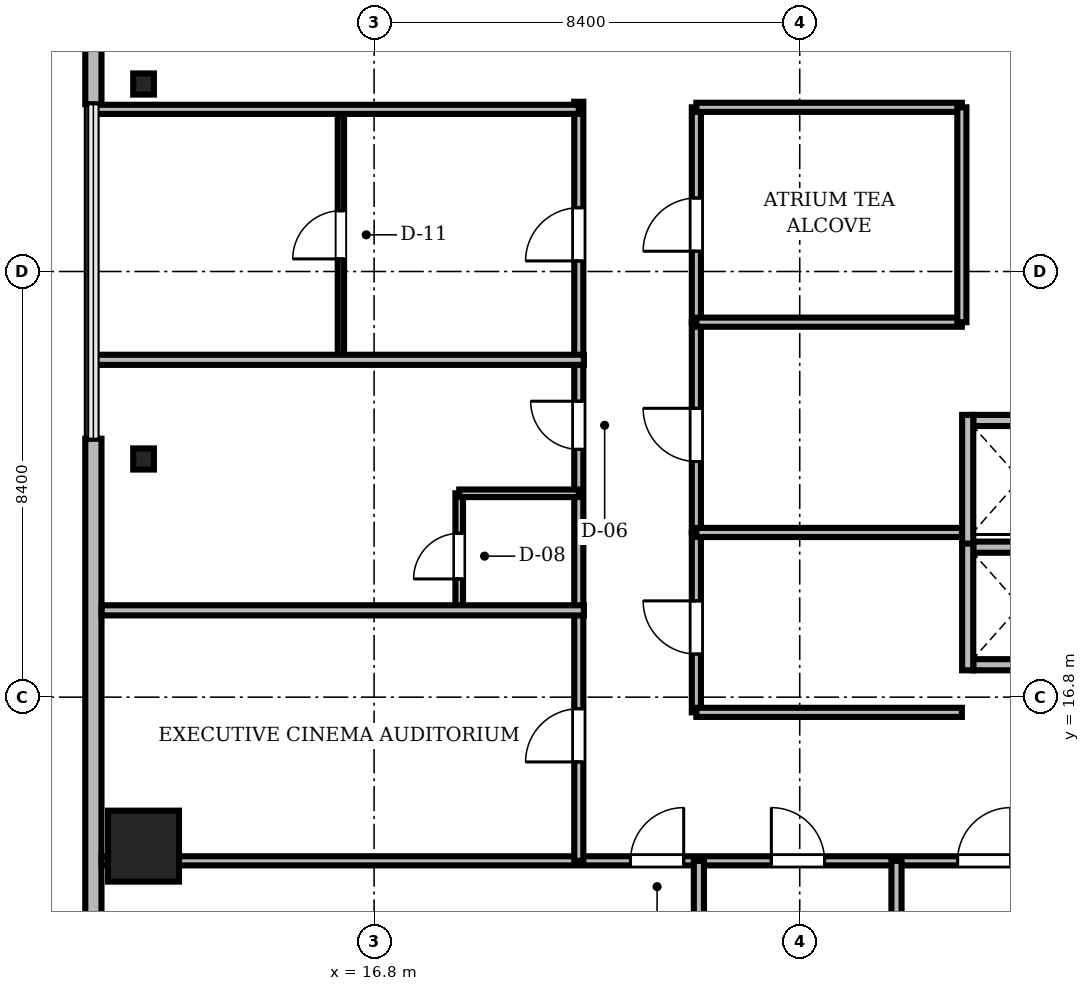
"""IFC4 building model, lengths in metres.
Left out: names, types, materials, properties, quantities, classifications, styles, units other than length and angle.
Written with IfcOpenShell. Run it as: python <this file> out.ifc"""

import sys

from ifc_helpers import new_model, si_unit, direction, frame, frame_2d, origin, origin_2d, place, context, subcontext, project, spatial, rectangle, i_section, extrude, source, transform, mapped, element, fill, save


model = new_model("IFC4")
c1 = context("Model", 3, precision=1e-05, world=origin(), true_north=direction((0.0, 1.0)))
c2 = subcontext(c1, "Body", "Model", "MODEL_VIEW")
j1 = project(units=[si_unit("LENGTHUNIT", "METRE"), si_unit("PLANEANGLEUNIT", "RADIAN")], contexts=[c1])
p1 = place(None, origin())
s1 = spatial("IfcSite", under=j1, at=p1, CompositionType="ELEMENT")
p2 = place(p1, origin())
s2 = spatial("IfcBuilding", under=s1, at=p2, CompositionType="ELEMENT")
p3 = place(p2, frame((0.0, 0.0, 218.55)))
s3 = spatial("IfcBuildingStorey", under=s2, at=p3, CompositionType="ELEMENT", Elevation=218.55)
m1 = source(origin(), c2, "Body", "SweptSolid", [
    extrude(rectangle(XDim=1.4, YDim=1.4, at=origin_2d()), origin(), (0.0, 0.0, 1.0), 3.53),
])
p4 = place(p3, frame((12.25, 13.86, 0.0), z_axis=(0.0, 0.0, 1.0), x_axis=(1.0, 0.0, 0.0)))
e1 = element("IfcColumn", 1, at=p4, inside=s3, PredefinedType="COLUMN", context=c2, shape_type="MappedRepresentation", body=[
    mapped(m1, transform((0.0, 0.0, 0.0), scale=1.0)),
])
m2 = source(origin(), c2, "Body", "SweptSolid", [
    extrude(i_section(OverallWidth=0.409, OverallDepth=0.417, WebThickness=0.021, FlangeThickness=0.033, FilletRadius=0.015, at=origin_2d()), origin(), (0.0, 0.0, 1.0), 3.53),
])
for number, where, z_axis, x_axis in (
    (2, (12.25, 28.9, 0.0), (0.0, 0.0, 1.0), (1.0, 0.0, 0.0)),
    (3, (12.25, 21.5, 0.0), (0.0, 0.0, 1.0), (1.0, 0.0, 0.0)),
):
    element("IfcColumn", number, at=place(p3, frame(where, z_axis=z_axis, x_axis=x_axis)), inside=s3, PredefinedType="COLUMN", context=c2, shape_type="MappedRepresentation", body=[
        mapped(m2, transform((0.0, 0.0, 0.0), scale=1.0)),
    ])
m3 = source(origin(), c2, "Body", "SweptSolid", [
    extrude(rectangle(XDim=15.6, YDim=0.32, at=frame_2d((7.8, 0.0))), origin(), (0.0, 0.0, 1.0), 3.53),
])
p5 = place(p3, frame((11.26, 44.1, 0.0), z_axis=(0.0, 0.0, 1.0), x_axis=(0.0, -1.0, 0.0)))
e4 = element("IfcWall", 4, at=p5, inside=s3, PredefinedType="SOLIDWALL", context=c2, shape_type="MappedRepresentation", body=[
    mapped(m3, transform((0.0, 0.0, 0.0), scale=1.0)),
])
m4 = source(origin(), c2, "Body", "SweptSolid", [
    extrude(rectangle(XDim=1.4, YDim=2.3, at=frame_2d((0.7, 1.15))), frame((0.0, 0.17, 0.0), z_axis=(0.0, -1.0, 0.0), x_axis=(1.0, 0.0, 0.0)), (0.0, 0.0, 1.0), 0.34),
])
p6 = place(p5, frame((9.61, 0.0, 0.0)))
e5 = element("IfcOpeningElement", 5, at=p6, cuts=e4, PredefinedType="OPENING", context=c2, shape_type="MappedRepresentation", body=[
    mapped(m4, transform((0.0, 0.0, 0.0), scale=1.0)),
])
m5 = source(origin(), c2, "Body", "SweptSolid", [
    extrude(rectangle(XDim=2.8, YDim=2.4, at=frame_2d((1.4, 1.2))), frame((0.0, 0.17, 0.0), z_axis=(0.0, -1.0, 0.0), x_axis=(1.0, 0.0, 0.0)), (0.0, 0.0, 1.0), 0.34),
])
p7 = place(p5, frame((2.705, 0.0, 0.72)))
e6 = element("IfcOpeningElement", 6, at=p7, cuts=e4, PredefinedType="OPENING", context=c2, shape_type="MappedRepresentation", body=[
    mapped(m5, transform((0.0, 0.0, 0.0), scale=1.0)),
])
m6 = source(origin(), c2, "Body", "SweptSolid", [
    extrude(rectangle(XDim=15.6, YDim=0.32, at=frame_2d((7.8, 0.0))), origin(), (0.0, 0.0, 1.0), 3.53),
])
p8 = place(p3, frame((11.26, 21.9, 0.0), z_axis=(0.0, 0.0, 1.0), x_axis=(0.0, -1.0, 0.0)))
e7 = element("IfcWall", 7, at=p8, inside=s3, PredefinedType="SOLIDWALL", context=c2, shape_type="MappedRepresentation", body=[
    mapped(m6, transform((0.0, 0.0, 0.0), scale=1.0)),
])
p9 = place(p8, frame((10.095, 0.0, 0.72)))
e8 = element("IfcOpeningElement", 8, at=p9, cuts=e7, PredefinedType="OPENING", context=c2, shape_type="MappedRepresentation", body=[
    mapped(m5, transform((0.0, 0.0, 0.0), scale=1.0)),
])
m7 = source(origin(), c2, "Body", "SweptSolid", [
    extrude(rectangle(XDim=1.85, YDim=0.22, at=frame_2d((0.925, 0.0))), origin(), (0.0, 0.0, 1.0), 2.972),
])
p10 = place(p3, frame((28.625, 17.44, 0.0), z_axis=(0.0, 0.0, 1.0), x_axis=(1.0, 0.0, 0.0)))
e9 = element("IfcWall", 9, at=p10, inside=s3, PredefinedType="SOLIDWALL", context=c2, shape_type="MappedRepresentation", body=[
    mapped(m7, transform((0.0, 0.0, 0.0), scale=1.0)),
])
m8 = source(origin(), c2, "Body", "SweptSolid", [
    extrude(rectangle(XDim=1.85, YDim=0.22, at=frame_2d((0.925, 0.0))), origin(), (0.0, 0.0, 1.0), 3.53),
])
p11 = place(p3, frame((28.625, 19.76, 0.0), z_axis=(0.0, 0.0, 1.0), x_axis=(1.0, 0.0, 0.0)))
e10 = element("IfcWall", 10, at=p11, inside=s3, PredefinedType="SOLIDWALL", context=c2, shape_type="MappedRepresentation", body=[
    mapped(m8, transform((0.0, 0.0, 0.0), scale=1.0)),
])
m9 = source(origin(), c2, "Body", "SweptSolid", [
    extrude(rectangle(XDim=2.54, YDim=0.22, at=frame_2d((1.27, 0.0))), origin(), (0.0, 0.0, 1.0), 2.972),
])
p12 = place(p3, frame((28.515, 17.33, 0.0), z_axis=(0.0, 0.0, 1.0), x_axis=(0.0, 1.0, 0.0)))
e11 = element("IfcWall", 11, at=p12, inside=s3, PredefinedType="SOLIDWALL", context=c2, shape_type="MappedRepresentation", body=[
    mapped(m9, transform((0.0, 0.0, 0.0), scale=1.0)),
])
p13 = place(p3, frame((28.625, 22.26, 0.0), z_axis=(0.0, 0.0, 1.0), x_axis=(1.0, 0.0, 0.0)))
e12 = element("IfcWall", 12, at=p13, inside=s3, PredefinedType="SOLIDWALL", context=c2, shape_type="MappedRepresentation", body=[
    mapped(m8, transform((0.0, 0.0, 0.0), scale=1.0)),
])
m10 = source(origin(), c2, "Body", "SweptSolid", [
    extrude(rectangle(XDim=2.54, YDim=0.22, at=frame_2d((1.27, 0.0))), origin(), (0.0, 0.0, 1.0), 3.53),
])
p14 = place(p3, frame((28.515, 19.83, 0.0), z_axis=(0.0, 0.0, 1.0), x_axis=(0.0, 1.0, 0.0)))
e13 = element("IfcWall", 13, at=p14, inside=s3, PredefinedType="SOLIDWALL", context=c2, shape_type="MappedRepresentation", body=[
    mapped(m10, transform((0.0, 0.0, 0.0), scale=1.0)),
])
m11 = source(origin(), c2, "Body", "SweptSolid", [
    extrude(rectangle(XDim=46.156, YDim=0.18, at=frame_2d((23.078, 0.0))), origin(), (0.0, 0.0, 1.0), 2.772),
])
p15 = place(p3, frame((11.422, 13.57, 0.0), z_axis=(0.0, 0.0, 1.0), x_axis=(1.0, 0.0, 0.0)))
e14 = element("IfcWall", 14, at=p15, inside=s3, PredefinedType="PARTITIONING", context=c2, shape_type="MappedRepresentation", body=[
    mapped(m11, transform((0.0, 0.0, 0.0), scale=1.0)),
])
m12 = source(origin(), c2, "Body", "SweptSolid", [
    extrude(rectangle(XDim=1.05, YDim=2.2, at=frame_2d((0.525, 1.1))), frame((0.0, 0.1, 0.0), z_axis=(0.0, -1.0, 0.0), x_axis=(1.0, 0.0, 0.0)), (0.0, 0.0, 1.0), 0.2),
])
p16 = place(p15, frame((10.438, 0.0, 0.0)))
e15 = element("IfcOpeningElement", 15, at=p16, cuts=e14, PredefinedType="OPENING", context=c2, shape_type="MappedRepresentation", body=[
    mapped(m12, transform((0.0, 0.0, 0.0), scale=1.0)),
])
p17 = place(p15, frame((13.218, 0.0, 0.0)))
e16 = element("IfcOpeningElement", 16, at=p17, cuts=e14, PredefinedType="OPENING", context=c2, shape_type="MappedRepresentation", body=[
    mapped(m12, transform((0.0, 0.0, 0.0), scale=1.0)),
])
p18 = place(p15, frame((16.893, 0.0, 0.0)))
e17 = element("IfcOpeningElement", 17, at=p18, cuts=e14, PredefinedType="OPENING", context=c2, shape_type="MappedRepresentation", body=[
    mapped(m12, transform((0.0, 0.0, 0.0), scale=1.0)),
])
p19 = place(p15, frame((20.346, 0.0, 0.0)))
e18 = element("IfcOpeningElement", 18, at=p19, cuts=e14, PredefinedType="OPENING", context=c2, shape_type="MappedRepresentation", body=[
    mapped(m12, transform((0.0, 0.0, 0.0), scale=1.0)),
])
p20 = place(p15, frame((24.124, 0.0, 0.0)))
e19 = element("IfcOpeningElement", 19, at=p20, cuts=e14, PredefinedType="OPENING", context=c2, shape_type="MappedRepresentation", body=[
    mapped(m12, transform((0.0, 0.0, 0.0), scale=1.0)),
])
p21 = place(p15, frame((28.226, 0.0, 0.0)))
e20 = element("IfcOpeningElement", 20, at=p21, cuts=e14, PredefinedType="OPENING", context=c2, shape_type="MappedRepresentation", body=[
    mapped(m12, transform((0.0, 0.0, 0.0), scale=1.0)),
])
p22 = place(p15, frame((33.077, 0.0, 0.0)))
e21 = element("IfcOpeningElement", 21, at=p22, cuts=e14, PredefinedType="OPENING", context=c2, shape_type="MappedRepresentation", body=[
    mapped(m12, transform((0.0, 0.0, 0.0), scale=1.0)),
])
p23 = place(p15, frame((37.498, 0.0, 0.0)))
e22 = element("IfcOpeningElement", 22, at=p23, cuts=e14, PredefinedType="OPENING", context=c2, shape_type="MappedRepresentation", body=[
    mapped(m12, transform((0.0, 0.0, 0.0), scale=1.0)),
])
m13 = source(origin(), c2, "Body", "SweptSolid", [
    extrude(rectangle(XDim=14.98, YDim=0.18, at=frame_2d((7.49, 0.0))), origin(), (0.0, 0.0, 1.0), 2.972),
])
p24 = place(p3, frame((20.84, 13.57, 0.0), z_axis=(0.0, 0.0, 1.0), x_axis=(0.0, 1.0, 0.0)))
e23 = element("IfcWall", 23, at=p24, inside=s3, PredefinedType="PARTITIONING", context=c2, shape_type="MappedRepresentation", body=[
    mapped(m13, transform((0.0, 0.0, 0.0), scale=1.0)),
])
p25 = place(p24, frame((1.952, 0.0, 0.0)))
e24 = element("IfcOpeningElement", 24, at=p25, cuts=e23, PredefinedType="OPENING", context=c2, shape_type="MappedRepresentation", body=[
    mapped(m12, transform((0.0, 0.0, 0.0), scale=1.0)),
])
m14 = source(origin(), c2, "Body", "SweptSolid", [
    extrude(rectangle(XDim=0.95, YDim=2.15, at=frame_2d((0.475, 1.075))), frame((0.0, 0.1, 0.0), z_axis=(0.0, -1.0, 0.0), x_axis=(1.0, 0.0, 0.0)), (0.0, 0.0, 1.0), 0.2),
])
p26 = place(p24, frame((8.12, 0.0, 0.0)))
e25 = element("IfcOpeningElement", 25, at=p26, cuts=e23, PredefinedType="OPENING", context=c2, shape_type="MappedRepresentation", body=[
    mapped(m14, transform((0.0, 0.0, 0.0), scale=1.0)),
])
p27 = place(p24, frame((11.838, 0.0, 0.0)))
e26 = element("IfcOpeningElement", 26, at=p27, cuts=e23, PredefinedType="OPENING", context=c2, shape_type="MappedRepresentation", body=[
    mapped(m12, transform((0.0, 0.0, 0.0), scale=1.0)),
])
m15 = source(origin(), c2, "Body", "SweptSolid", [
    extrude(rectangle(XDim=4.943, YDim=0.125, at=frame_2d((2.471, 0.0))), origin(), (0.0, 0.0, 1.0), 2.972),
])
p28 = place(p3, frame((16.145, 23.457, 0.0), z_axis=(0.0, 0.0, 1.0), x_axis=(0.0, 1.0, 0.0)))
e27 = element("IfcWall", 27, at=p28, inside=s3, PredefinedType="PARTITIONING", context=c2, shape_type="MappedRepresentation", body=[
    mapped(m15, transform((0.0, 0.0, 0.0), scale=1.0)),
])
m16 = source(origin(), c2, "Body", "SweptSolid", [
    extrude(rectangle(XDim=0.95, YDim=2.15, at=frame_2d((0.475, 1.075))), frame((0.0, 0.073, 0.0), z_axis=(0.0, -1.0, 0.0), x_axis=(1.0, 0.0, 0.0)), (0.0, 0.0, 1.0), 0.145),
])
p29 = place(p28, frame((1.992, 0.0, 0.0)))
e28 = element("IfcOpeningElement", 28, at=p29, cuts=e27, PredefinedType="OPENING", context=c2, shape_type="MappedRepresentation", body=[
    mapped(m16, transform((0.0, 0.0, 0.0), scale=1.0)),
])
m17 = source(origin(), c2, "Body", "SweptSolid", [
    extrude(rectangle(XDim=4.24, YDim=0.18, at=frame_2d((2.12, 0.0))), origin(), (0.0, 0.0, 1.0), 2.972),
])
p30 = place(p3, frame((23.16, 24.2, 0.0), z_axis=(0.0, 0.0, 1.0), x_axis=(0.0, 1.0, 0.0)))
e29 = element("IfcWall", 29, at=p30, inside=s3, PredefinedType="PARTITIONING", context=c2, shape_type="MappedRepresentation", body=[
    mapped(m17, transform((0.0, 0.0, 0.0), scale=1.0)),
])
p31 = place(p30, frame((1.4, 0.0, 0.0)))
e30 = element("IfcOpeningElement", 30, at=p31, cuts=e29, PredefinedType="OPENING", context=c2, shape_type="MappedRepresentation", body=[
    mapped(m12, transform((0.0, 0.0, 0.0), scale=1.0)),
])
m18 = source(origin(), c2, "Body", "SweptSolid", [
    extrude(rectangle(XDim=4.15, YDim=0.18, at=frame_2d((2.075, 0.0))), origin(), (0.0, 0.0, 1.0), 3.222),
])
p32 = place(p3, frame((23.16, 20.05, 0.0), z_axis=(0.0, 0.0, 1.0), x_axis=(0.0, 1.0, 0.0)))
e31 = element("IfcWall", 31, at=p32, inside=s3, PredefinedType="PARTITIONING", context=c2, shape_type="MappedRepresentation", body=[
    mapped(m18, transform((0.0, 0.0, 0.0), scale=1.0)),
])
p33 = place(p32, frame((1.4, 0.0, 0.0)))
e32 = element("IfcOpeningElement", 32, at=p33, cuts=e31, PredefinedType="OPENING", context=c2, shape_type="MappedRepresentation", body=[
    mapped(m12, transform((0.0, 0.0, 0.0), scale=1.0)),
])
m19 = source(origin(), c2, "Body", "SweptSolid", [
    extrude(rectangle(XDim=3.55, YDim=0.18, at=frame_2d((1.775, 0.0))), origin(), (0.0, 0.0, 1.0), 2.972),
])
p34 = place(p3, frame((23.16, 16.5, 0.0), z_axis=(0.0, 0.0, 1.0), x_axis=(0.0, 1.0, 0.0)))
e33 = element("IfcWall", 33, at=p34, inside=s3, PredefinedType="PARTITIONING", context=c2, shape_type="MappedRepresentation", body=[
    mapped(m19, transform((0.0, 0.0, 0.0), scale=1.0)),
])
p35 = place(p34, frame((1.15, 0.0, 0.0)))
e34 = element("IfcOpeningElement", 34, at=p35, cuts=e33, PredefinedType="OPENING", context=c2, shape_type="MappedRepresentation", body=[
    mapped(m12, transform((0.0, 0.0, 0.0), scale=1.0)),
])
m20 = source(origin(), c2, "Body", "SweptSolid", [
    extrude(rectangle(XDim=2.29, YDim=0.15, at=frame_2d((1.145, 0.0))), origin(), (0.0, 0.0, 1.0), 2.972),
])
p36 = place(p3, frame((18.48, 18.533, 0.0), z_axis=(0.0, 0.0, 1.0), x_axis=(0.0, 1.0, 0.0)))
e35 = element("IfcWall", 35, at=p36, inside=s3, PredefinedType="PARTITIONING", context=c2, shape_type="MappedRepresentation", body=[
    mapped(m20, transform((0.0, 0.0, 0.0), scale=1.0)),
])
m21 = source(origin(), c2, "Body", "SweptSolid", [
    extrude(rectangle(XDim=0.9, YDim=2.1, at=frame_2d((0.45, 1.05))), frame((0.0, 0.085, 0.0), z_axis=(0.0, -1.0, 0.0), x_axis=(1.0, 0.0, 0.0)), (0.0, 0.0, 1.0), 0.17),
])
p37 = place(p36, frame((0.6, 0.0, 0.0)))
e36 = element("IfcOpeningElement", 36, at=p37, cuts=e35, PredefinedType="OPENING", context=c2, shape_type="MappedRepresentation", body=[
    mapped(m21, transform((0.0, 0.0, 0.0), scale=1.0)),
])
m22 = source(origin(), c2, "Body", "SweptSolid", [
    extrude(rectangle(XDim=11.448, YDim=0.2, at=frame_2d((5.724, 0.0))), origin(), (0.0, 0.0, 1.0), 2.772),
])
for number, where, z_axis, x_axis in (
    (37, (23.21, 2.122, 0.0), (0.0, 0.0, 1.0), (0.0, 1.0, 0.0)),
    (38, (27.11, 2.122, 0.0), (0.0, 0.0, 1.0), (0.0, 1.0, 0.0)),
):
    element("IfcWall", number, at=place(p3, frame(where, z_axis=z_axis, x_axis=x_axis)), inside=s3, PredefinedType="PARTITIONING", context=c2, shape_type="MappedRepresentation", body=[
        mapped(m22, transform((0.0, 0.0, 0.0), scale=1.0)),
    ])
m23 = source(origin(), c2, "Body", "SweptSolid", [
    extrude(rectangle(XDim=9.518, YDim=0.2, at=frame_2d((4.759, 0.0))), origin(), (0.0, 0.0, 1.0), 2.772),
])
p38 = place(p3, frame((11.422, 18.513, 0.0), z_axis=(0.0, 0.0, 1.0), x_axis=(1.0, 0.0, 0.0)))
e39 = element("IfcWall", 39, at=p38, inside=s3, PredefinedType="PARTITIONING", context=c2, shape_type="MappedRepresentation", body=[
    mapped(m23, transform((0.0, 0.0, 0.0), scale=1.0)),
])
m24 = source(origin(), c2, "Body", "SweptSolid", [
    extrude(rectangle(XDim=9.71, YDim=0.2, at=frame_2d((4.855, 0.0))), origin(), (0.0, 0.0, 1.0), 2.772),
])
p39 = place(p3, frame((11.23, 23.457, 0.0), z_axis=(0.0, 0.0, 1.0), x_axis=(1.0, 0.0, 0.0)))
e40 = element("IfcWall", 40, at=p39, inside=s3, PredefinedType="PARTITIONING", context=c2, shape_type="MappedRepresentation", body=[
    mapped(m24, transform((0.0, 0.0, 0.0), scale=1.0)),
])
m25 = source(origin(), c2, "Body", "SweptSolid", [
    extrude(rectangle(XDim=9.61, YDim=0.18, at=frame_2d((4.805, 0.0))), origin(), (0.0, 0.0, 1.0), 2.772),
])
p40 = place(p3, frame((11.23, 28.4, 0.0), z_axis=(0.0, 0.0, 1.0), x_axis=(1.0, 0.0, 0.0)))
e41 = element("IfcWall", 41, at=p40, inside=s3, PredefinedType="PARTITIONING", context=c2, shape_type="MappedRepresentation", body=[
    mapped(m25, transform((0.0, 0.0, 0.0), scale=1.0)),
])
m26 = source(origin(), c2, "Body", "SweptSolid", [
    extrude(rectangle(XDim=5.24, YDim=0.18, at=frame_2d((2.62, 0.0))), origin(), (0.0, 0.0, 1.0), 3.53),
])
for number, where, z_axis, x_axis in (
    (42, (23.16, 16.5, 0.0), (0.0, 0.0, 1.0), (1.0, 0.0, 0.0)),
    (43, (23.16, 20.05, 0.0), (0.0, 0.0, 1.0), (1.0, 0.0, 0.0)),
    (44, (23.16, 24.2, 0.0), (0.0, 0.0, 1.0), (1.0, 0.0, 0.0)),
    (45, (23.16, 28.44, 0.0), (0.0, 0.0, 1.0), (1.0, 0.0, 0.0)),
):
    element("IfcWall", number, at=place(p3, frame(where, z_axis=z_axis, x_axis=x_axis)), inside=s3, PredefinedType="PARTITIONING", context=c2, shape_type="MappedRepresentation", body=[
        mapped(m26, transform((0.0, 0.0, 0.0), scale=1.0)),
    ])
p41 = place(p3, frame((28.4, 24.2, 0.0), z_axis=(0.0, 0.0, 1.0), x_axis=(0.0, 1.0, 0.0)))
e46 = element("IfcWall", 46, at=p41, inside=s3, PredefinedType="PARTITIONING", context=c2, shape_type="MappedRepresentation", body=[
    mapped(m17, transform((0.0, 0.0, 0.0), scale=1.0)),
])
m27 = source(origin(), c2, "Body", "SweptSolid", [
    extrude(rectangle(XDim=2.36, YDim=0.15, at=frame_2d((1.18, 0.0))), origin(), (0.0, 0.0, 1.0), 3.53),
])
p42 = place(p3, frame((18.48, 20.823, 0.0), z_axis=(0.0, 0.0, 1.0), x_axis=(1.0, 0.0, 0.0)))
e47 = element("IfcWall", 47, at=p42, inside=s3, PredefinedType="PARTITIONING", context=c2, shape_type="MappedRepresentation", body=[
    mapped(m27, transform((0.0, 0.0, 0.0), scale=1.0)),
])
m28 = source(origin(), c2, "Body", "SweptSolid", [
    extrude(rectangle(XDim=1.05, YDim=2.2, at=frame_2d((0.525, 1.1))), frame((0.0, 0.025, 0.0), z_axis=(0.0, -1.0, 0.0), x_axis=(1.0, 0.0, 0.0)), (0.0, 0.0, 1.0), 0.05),
])
p43 = place(p16, origin())
e48 = element("IfcDoor", 48, at=p43, inside=s3, OperationType="SINGLE_SWING_RIGHT", PredefinedType="DOOR", context=c2, shape_type="MappedRepresentation", body=[
    mapped(m28, transform((0.0, 0.0, 0.0), scale=1.0)),
])
fill(e15, e48)
p44 = place(p17, origin())
e49 = element("IfcDoor", 49, at=p44, inside=s3, OperationType="SINGLE_SWING_LEFT", PredefinedType="DOOR", context=c2, shape_type="MappedRepresentation", body=[
    mapped(m28, transform((0.0, 0.0, 0.0), scale=1.0)),
])
fill(e16, e49)
p45 = place(p18, origin())
e50 = element("IfcDoor", 50, at=p45, inside=s3, OperationType="SINGLE_SWING_RIGHT", PredefinedType="DOOR", context=c2, shape_type="MappedRepresentation", body=[
    mapped(m28, transform((0.0, 0.0, 0.0), scale=1.0)),
])
fill(e17, e50)
p46 = place(p25, origin())
e51 = element("IfcDoor", 51, at=p46, inside=s3, OperationType="SINGLE_SWING_LEFT", PredefinedType="DOOR", context=c2, shape_type="MappedRepresentation", body=[
    mapped(m28, transform((0.0, 0.0, 0.0), scale=1.0)),
])
fill(e24, e51)
m29 = source(origin(), c2, "Body", "SweptSolid", [
    extrude(rectangle(XDim=0.95, YDim=2.15, at=frame_2d((0.475, 1.075))), frame((0.0, 0.025, 0.0), z_axis=(0.0, -1.0, 0.0), x_axis=(1.0, 0.0, 0.0)), (0.0, 0.0, 1.0), 0.05),
])
p47 = place(p26, origin())
e52 = element("IfcDoor", 52, at=p47, inside=s3, OperationType="SINGLE_SWING_RIGHT", PredefinedType="DOOR", context=c2, shape_type="MappedRepresentation", body=[
    mapped(m29, transform((0.0, 0.0, 0.0), scale=1.0)),
])
fill(e25, e52)
p48 = place(p27, origin())
e53 = element("IfcDoor", 53, at=p48, inside=s3, OperationType="SINGLE_SWING_LEFT", PredefinedType="DOOR", context=c2, shape_type="MappedRepresentation", body=[
    mapped(m28, transform((0.0, 0.0, 0.0), scale=1.0)),
])
fill(e26, e53)
p49 = place(p29, origin())
e54 = element("IfcDoor", 54, at=p49, inside=s3, OperationType="SINGLE_SWING_LEFT", PredefinedType="DOOR", context=c2, shape_type="MappedRepresentation", body=[
    mapped(m29, transform((0.0, 0.0, 0.0), scale=1.0)),
])
fill(e28, e54)
p50 = place(p31, origin())
e55 = element("IfcDoor", 55, at=p50, inside=s3, OperationType="SINGLE_SWING_LEFT", PredefinedType="DOOR", context=c2, shape_type="MappedRepresentation", body=[
    mapped(m28, transform((0.0, 0.0, 0.0), scale=1.0)),
])
fill(e30, e55)
p51 = place(p33, origin())
e56 = element("IfcDoor", 56, at=p51, inside=s3, OperationType="SINGLE_SWING_RIGHT", PredefinedType="DOOR", context=c2, shape_type="MappedRepresentation", body=[
    mapped(m28, transform((0.0, 0.0, 0.0), scale=1.0)),
])
fill(e32, e56)
p52 = place(p35, origin())
e57 = element("IfcDoor", 57, at=p52, inside=s3, OperationType="SINGLE_SWING_RIGHT", PredefinedType="DOOR", context=c2, shape_type="MappedRepresentation", body=[
    mapped(m28, transform((0.0, 0.0, 0.0), scale=1.0)),
])
fill(e34, e57)
m30 = source(origin(), c2, "Body", "SweptSolid", [
    extrude(rectangle(XDim=0.9, YDim=2.1, at=frame_2d((0.45, 1.05))), frame((0.0, 0.025, 0.0), z_axis=(0.0, -1.0, 0.0), x_axis=(1.0, 0.0, 0.0)), (0.0, 0.0, 1.0), 0.05),
])
p53 = place(p37, origin())
e58 = element("IfcDoor", 58, at=p53, inside=s3, OperationType="SINGLE_SWING_LEFT", PredefinedType="DOOR", context=c2, shape_type="MappedRepresentation", body=[
    mapped(m30, transform((0.0, 0.0, 0.0), scale=1.0)),
])
fill(e36, e58)
save(model, sys.argv[1])
